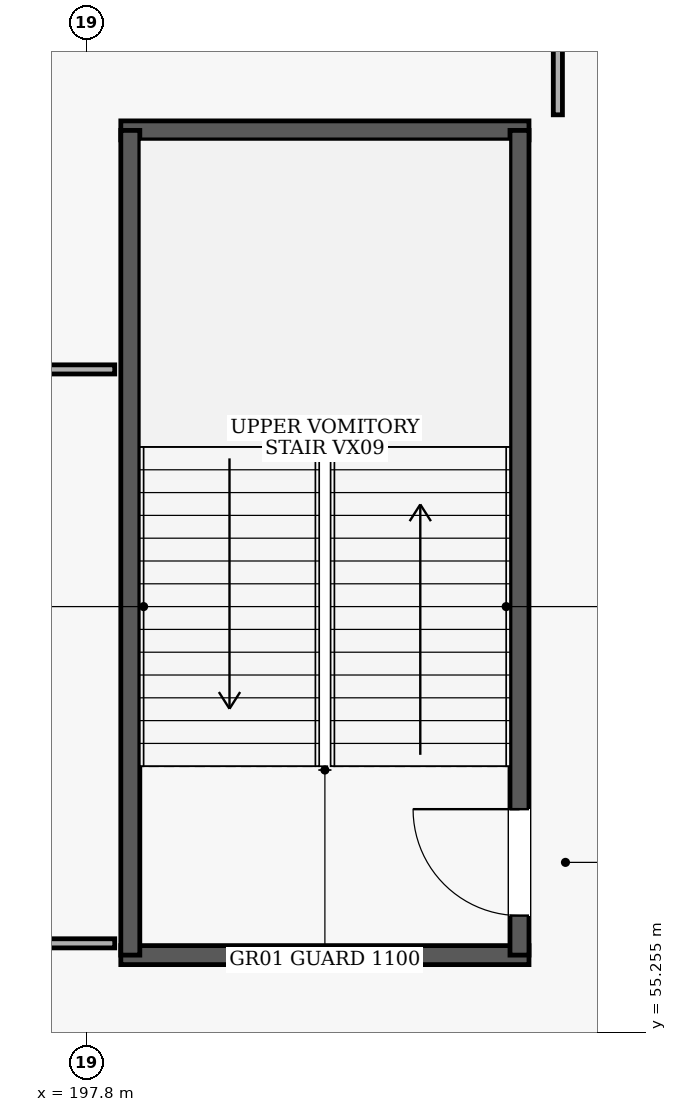
"""IFC4 building model, lengths in metres.
Left out: names, types, materials, properties, quantities, classifications, styles, units other than length and angle.
Written with IfcOpenShell. Run it as: python <this file> out.ifc"""

import sys

from ifc_helpers import new_model, si_unit, direction, frame, frame_2d, origin, place, context, subcontext, project, spatial, rectangle, extrude, element, fill, save


model = new_model("IFC4")
c1 = context("Model", 3, precision=1e-05, world=origin(), true_north=direction((0.0, 1.0)))
c2 = subcontext(c1, "Body", "Model", "MODEL_VIEW")
j1 = project(units=[si_unit("LENGTHUNIT", "METRE"), si_unit("PLANEANGLEUNIT", "RADIAN")], contexts=[c1])
p1 = place(None, origin())
s1 = spatial("IfcSite", under=j1, at=p1, CompositionType="ELEMENT")
p2 = place(p1, origin())
s2 = spatial("IfcBuilding", under=s1, at=p2, CompositionType="ELEMENT")
p3 = place(p2, frame((0.0, 0.0, 10.2)))
s3 = spatial("IfcBuildingStorey", under=s2, at=p3, CompositionType="ELEMENT", Elevation=10.2)
for number, where, z_axis, x_axis in (
    (1, (198.25, 56.275, 0.0), (0.0, 0.0, 1.0), (1.0, 0.0, 0.0)),
    (2, (203.62, 67.125, 0.0), (0.0, 0.0, 1.0), (-1.0, 0.0, 0.0)),
):
    element("IfcWall", number, at=place(p3, frame(where, z_axis=z_axis, x_axis=x_axis)), inside=s3, PredefinedType="SHEAR", context=c2, shape_type="SweptSolid", body=[
        extrude(rectangle(XDim=5.37, YDim=0.25, at=frame_2d((2.685, 0.0))), origin(), (0.0, 0.0, 1.0), 4.48),
    ])
p4 = place(p3, frame((198.375, 56.275, 0.0), z_axis=(0.0, 0.0, 1.0), x_axis=(0.0, 1.0, 0.0)))
e3 = element("IfcWall", 3, at=p4, inside=s3, PredefinedType="SHEAR", context=c2, shape_type="SweptSolid", body=[
    extrude(rectangle(XDim=10.85, YDim=0.25, at=frame_2d((5.425, 0.0))), origin(), (0.0, 0.0, 1.0), 4.48),
])
p5 = place(p3, frame((203.495, 56.275, 0.0), z_axis=(0.0, 0.0, 1.0), x_axis=(0.0, 1.0, 0.0)))
e4 = element("IfcWall", 4, at=p5, inside=s3, PredefinedType="SHEAR", context=c2, shape_type="SweptSolid", body=[
    extrude(rectangle(XDim=10.85, YDim=0.25, at=frame_2d((5.425, 0.0))), origin(), (0.0, 0.0, 1.0), 4.48),
])
p6 = place(p5, frame((0.52, 0.0, 0.0)))
e5 = element("IfcOpeningElement", 5, at=p6, cuts=e4, PredefinedType="OPENING", context=c2, shape_type="SweptSolid", body=[
    extrude(rectangle(XDim=1.4, YDim=2.15, at=frame_2d((0.7, 1.075))), frame((0.0, 0.135, 0.0), z_axis=(0.0, -1.0, 0.0), x_axis=(1.0, 0.0, 0.0)), (0.0, 0.0, 1.0), 0.27),
])
p7 = place(p3, frame((183.4, 56.43, 0.0), z_axis=(0.0, 0.0, 1.0), x_axis=(1.0, 0.0, 0.0)))
e6 = element("IfcWall", 6, at=p7, inside=s3, PredefinedType="PARTITIONING", context=c2, shape_type="SweptSolid", body=[
    extrude(rectangle(XDim=14.77, YDim=0.12, at=frame_2d((7.385, 0.0))), origin(), (0.0, 0.0, 1.0), 4.48),
])
p8 = place(p7, frame((6.825, 0.0, 0.0)))
e7 = element("IfcOpeningElement", 7, at=p8, cuts=e6, PredefinedType="OPENING", context=c2, shape_type="SweptSolid", body=[
    extrude(rectangle(XDim=1.12, YDim=2.15, at=frame_2d((0.56, 1.075))), frame((0.0, 0.07, 0.0), z_axis=(0.0, -1.0, 0.0), x_axis=(1.0, 0.0, 0.0)), (0.0, 0.0, 1.0), 0.14),
])
p9 = place(p3, frame((198.17, 63.98, 0.0), z_axis=(0.0, 0.0, 1.0), x_axis=(-1.0, 0.0, 0.0)))
e8 = element("IfcWall", 8, at=p9, inside=s3, PredefinedType="PARTITIONING", context=c2, shape_type="SweptSolid", body=[
    extrude(rectangle(XDim=14.77, YDim=0.12, at=frame_2d((7.385, 0.0))), origin(), (0.0, 0.0, 1.0), 4.48),
])
p10 = place(p3, frame((204.0, 67.33, 0.0), z_axis=(0.0, 0.0, 1.0), x_axis=(0.0, 1.0, 0.0)))
e9 = element("IfcWall", 9, at=p10, inside=s3, PredefinedType="PARTITIONING", context=c2, shape_type="SweptSolid", body=[
    extrude(rectangle(XDim=3.14, YDim=0.12, at=frame_2d((1.57, 0.0))), origin(), (0.0, 0.0, 1.0), 4.48),
])
p11 = place(p10, frame((0.97, 0.0, 0.0)))
e10 = element("IfcOpeningElement", 10, at=p11, cuts=e9, PredefinedType="OPENING", context=c2, shape_type="SweptSolid", body=[
    extrude(rectangle(XDim=1.2, YDim=2.15, at=frame_2d((0.6, 1.075))), frame((0.0, 0.07, 0.0), z_axis=(0.0, -1.0, 0.0), x_axis=(1.0, 0.0, 0.0)), (0.0, 0.0, 1.0), 0.14),
])
p12 = place(p6, origin())
e11 = element("IfcDoor", 11, at=p12, inside=s3, OperationType="SINGLE_SWING_RIGHT", PredefinedType="DOOR", context=c2, shape_type="SweptSolid", body=[
    extrude(rectangle(XDim=1.4, YDim=2.15, at=frame_2d((0.7, 1.075))), frame((0.0, 0.025, 0.0), z_axis=(0.0, -1.0, 0.0), x_axis=(1.0, 0.0, 0.0)), (0.0, 0.0, 1.0), 0.05),
])
fill(e5, e11)
save(model, sys.argv[1])
